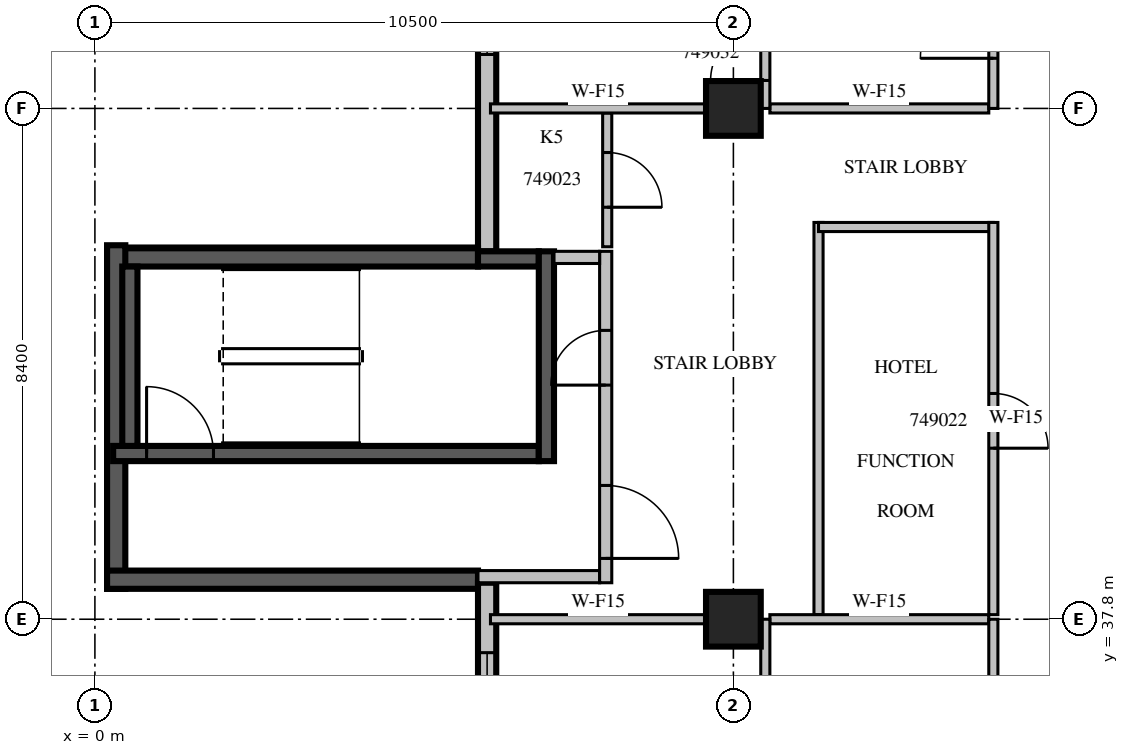
"""IFC4 building model, lengths in metres.
Left out: names, types, materials, properties, quantities, classifications, styles, units other than length and angle.
Written with IfcOpenShell. Run it as: python <this file> out.ifc"""

import sys

from ifc_helpers import new_model, si_unit, direction, frame, frame_2d, origin, origin_2d, place, context, subcontext, project, spatial, rectangle, extrude, source, transform, mapped, element, fill, save


model = new_model("IFC4")
c1 = context("Model", 3, precision=1e-05, world=origin(), true_north=direction((0.0, 1.0)))
c2 = subcontext(c1, "Body", "Model", "MODEL_VIEW")
j1 = project(units=[si_unit("LENGTHUNIT", "METRE"), si_unit("PLANEANGLEUNIT", "RADIAN")], contexts=[c1])
p1 = place(None, origin())
s1 = spatial("IfcSite", under=j1, at=p1, CompositionType="ELEMENT")
p2 = place(p1, origin())
s2 = spatial("IfcBuilding", under=s1, at=p2, CompositionType="ELEMENT")
p3 = place(p2, frame((0.0, 0.0, 219.6)))
s3 = spatial("IfcBuildingStorey", under=s2, at=p3, CompositionType="ELEMENT", Elevation=219.6)
m1 = source(origin(), c2, "Body", "SweptSolid", [
    extrude(rectangle(XDim=0.9, YDim=0.9, at=origin_2d()), origin(), (0.0, 0.0, 1.0), 3.8),
])
for number, where, z_axis, x_axis in (
    (1, (10.5, 37.8, 0.0), (0.0, 0.0, 1.0), (1.0, 0.0, 0.0)),
    (2, (10.5, 46.2, 0.0), (0.0, 0.0, 1.0), (1.0, 0.0, 0.0)),
):
    element("IfcColumn", number, at=place(p3, frame(where, z_axis=z_axis, x_axis=x_axis)), inside=s3, PredefinedType="COLUMN", context=c2, shape_type="MappedRepresentation", body=[
        mapped(m1, transform((0.0, 0.0, 0.0), scale=1.0)),
    ])
m2 = source(origin(), c2, "Body", "SweptSolid", [
    extrude(rectangle(XDim=9.91, YDim=0.3, at=frame_2d((4.955, 0.0))), origin(), (0.0, 0.0, 1.0), 3.4),
])
p4 = place(p3, frame((6.45, 53.76, 0.0), z_axis=(0.0, 0.0, 1.0), x_axis=(0.0, -1.0, 0.0)))
e3 = element("IfcWall", 3, at=p4, inside=s3, PredefinedType="STANDARD", context=c2, shape_type="MappedRepresentation", body=[
    mapped(m2, transform((0.0, 0.0, 0.0), scale=1.0)),
])
m3 = source(origin(), c2, "Body", "SweptSolid", [
    extrude(rectangle(XDim=2.4, YDim=2.3, at=frame_2d((1.2, 1.15))), frame((0.0, 0.16, 0.0), z_axis=(0.0, -1.0, 0.0), x_axis=(1.0, 0.0, 0.0)), (0.0, 0.0, 1.0), 0.32),
])
p5 = place(p4, frame((4.272, 0.0, 0.6)))
e4 = element("IfcOpeningElement", 4, at=p5, cuts=e3, PredefinedType="OPENING", context=c2, shape_type="MappedRepresentation", body=[
    mapped(m3, transform((0.0, 0.0, 0.0), scale=1.0)),
])
p6 = place(p4, frame((0.936, 0.0, 0.6)))
e5 = element("IfcOpeningElement", 5, at=p6, cuts=e3, PredefinedType="OPENING", context=c2, shape_type="MappedRepresentation", body=[
    mapped(m3, transform((0.0, 0.0, 0.0), scale=1.0)),
])
m4 = source(origin(), c2, "Body", "SweptSolid", [
    extrude(rectangle(XDim=6.1, YDim=0.3, at=frame_2d((3.05, 0.0))), origin(), (0.0, 0.0, 1.0), 3.4),
])
p7 = place(p3, frame((6.3, 43.75, 0.0), z_axis=(0.0, 0.0, 1.0), x_axis=(-1.0, 0.0, 0.0)))
e6 = element("IfcWall", 6, at=p7, inside=s3, PredefinedType="SOLIDWALL", context=c2, shape_type="MappedRepresentation", body=[
    mapped(m4, transform((0.0, 0.0, 0.0), scale=1.0)),
])
m5 = source(origin(), c2, "Body", "SweptSolid", [
    extrude(rectangle(XDim=5.65, YDim=0.3, at=frame_2d((2.825, 0.0))), origin(), (0.0, 0.0, 1.0), 3.4),
])
p8 = place(p3, frame((0.35, 43.95, 0.0), z_axis=(0.0, 0.0, 1.0), x_axis=(0.0, -1.0, 0.0)))
e7 = element("IfcWall", 7, at=p8, inside=s3, PredefinedType="SOLIDWALL", context=c2, shape_type="MappedRepresentation", body=[
    mapped(m5, transform((0.0, 0.0, 0.0), scale=1.0)),
])
p9 = place(p3, frame((0.2, 38.45, 0.0), z_axis=(0.0, 0.0, 1.0), x_axis=(1.0, 0.0, 0.0)))
e8 = element("IfcWall", 8, at=p9, inside=s3, PredefinedType="SOLIDWALL", context=c2, shape_type="MappedRepresentation", body=[
    mapped(m4, transform((0.0, 0.0, 0.0), scale=1.0)),
])
m6 = source(origin(), c2, "Body", "SweptSolid", [
    extrude(rectangle(XDim=16.6, YDim=0.3, at=frame_2d((8.3, 0.0))), origin(), (0.0, 0.0, 1.0), 3.4),
])
p10 = place(p3, frame((6.45, 38.4, 0.0), z_axis=(0.0, 0.0, 1.0), x_axis=(0.0, -1.0, 0.0)))
e9 = element("IfcWall", 9, at=p10, inside=s3, PredefinedType="STANDARD", context=c2, shape_type="MappedRepresentation", body=[
    mapped(m6, transform((0.0, 0.0, 0.0), scale=1.0)),
])
m7 = source(origin(), c2, "Body", "SweptSolid", [
    extrude(rectangle(XDim=1.8, YDim=2.3, at=frame_2d((0.9, 1.15))), frame((0.0, 0.16, 0.0), z_axis=(0.0, -1.0, 0.0), x_axis=(1.0, 0.0, 0.0)), (0.0, 0.0, 1.0), 0.32),
])
p11 = place(p10, frame((1.15, 0.0, 0.6)))
e10 = element("IfcOpeningElement", 10, at=p11, cuts=e9, PredefinedType="OPENING", context=c2, shape_type="MappedRepresentation", body=[
    mapped(m7, transform((0.0, 0.0, 0.0), scale=1.0)),
])
p12 = place(p10, frame((9.438, 0.0, 0.6)))
e11 = element("IfcOpeningElement", 11, at=p12, cuts=e9, PredefinedType="OPENING", context=c2, shape_type="MappedRepresentation", body=[
    mapped(m7, transform((0.0, 0.0, 0.0), scale=1.0)),
])
m8 = source(origin(), c2, "Body", "SweptSolid", [
    extrude(rectangle(XDim=1.2, YDim=2.3, at=frame_2d((0.6, 1.15))), frame((0.0, 0.16, 0.0), z_axis=(0.0, -1.0, 0.0), x_axis=(1.0, 0.0, 0.0)), (0.0, 0.0, 1.0), 0.32),
])
p13 = place(p10, frame((14.338, 0.0, 0.6)))
e12 = element("IfcOpeningElement", 12, at=p13, cuts=e9, PredefinedType="OPENING", context=c2, shape_type="MappedRepresentation", body=[
    mapped(m8, transform((0.0, 0.0, 0.0), scale=1.0)),
])
p14 = place(p10, frame((11.887, 0.0, 0.6)))
e13 = element("IfcOpeningElement", 13, at=p14, cuts=e9, PredefinedType="OPENING", context=c2, shape_type="MappedRepresentation", body=[
    mapped(m7, transform((0.0, 0.0, 0.0), scale=1.0)),
])
m9 = source(origin(), c2, "Body", "SweptSolid", [
    extrude(rectangle(XDim=1.0, YDim=2.1, at=frame_2d((0.5, 1.05))), frame((0.0, 0.16, 0.0), z_axis=(0.0, -1.0, 0.0), x_axis=(1.0, 0.0, 0.0)), (0.0, 0.0, 1.0), 0.32),
])
p15 = place(p10, frame((5.908, 0.0, 0.0)))
e14 = element("IfcOpeningElement", 14, at=p15, cuts=e9, PredefinedType="OPENING", context=c2, shape_type="MappedRepresentation", body=[
    mapped(m9, transform((0.0, 0.0, 0.0), scale=1.0)),
])
m10 = source(origin(), c2, "Body", "SweptSolid", [
    extrude(rectangle(XDim=7.0, YDim=0.25, at=frame_2d((3.5, 0.0))), origin(), (0.0, 0.0, 1.0), 3.4),
])
p16 = place(p3, frame((0.3, 40.525, 0.0), z_axis=(0.0, 0.0, 1.0), x_axis=(1.0, 0.0, 0.0)))
e15 = element("IfcWall", 15, at=p16, inside=s3, PredefinedType="SOLIDWALL", context=c2, shape_type="MappedRepresentation", body=[
    mapped(m10, transform((0.0, 0.0, 0.0), scale=1.0)),
])
m11 = source(origin(), c2, "Body", "SweptSolid", [
    extrude(rectangle(XDim=1.1, YDim=2.1, at=frame_2d((0.55, 1.05))), frame((0.0, 0.135, 0.0), z_axis=(0.0, -1.0, 0.0), x_axis=(1.0, 0.0, 0.0)), (0.0, 0.0, 1.0), 0.27),
])
p17 = place(p16, frame((0.55, 0.0, 0.0)))
e16 = element("IfcOpeningElement", 16, at=p17, cuts=e15, PredefinedType="OPENING", context=c2, shape_type="MappedRepresentation", body=[
    mapped(m11, transform((0.0, 0.0, 0.0), scale=1.0)),
])
m12 = source(origin(), c2, "Body", "SweptSolid", [
    extrude(rectangle(XDim=1.0, YDim=0.25, at=frame_2d((0.5, 0.0))), origin(), (0.0, 0.0, 1.0), 3.4),
])
p18 = place(p3, frame((6.3, 43.725, 0.0), z_axis=(0.0, 0.0, 1.0), x_axis=(1.0, 0.0, 0.0)))
e17 = element("IfcWall", 17, at=p18, inside=s3, PredefinedType="SOLIDWALL", context=c2, shape_type="MappedRepresentation", body=[
    mapped(m12, transform((0.0, 0.0, 0.0), scale=1.0)),
])
m13 = source(origin(), c2, "Body", "SweptSolid", [
    extrude(rectangle(XDim=3.45, YDim=0.25, at=frame_2d((1.725, 0.0))), origin(), (0.0, 0.0, 1.0), 3.4),
])
p19 = place(p3, frame((7.425, 40.4, 0.0), z_axis=(0.0, 0.0, 1.0), x_axis=(0.0, 1.0, 0.0)))
e18 = element("IfcWall", 18, at=p19, inside=s3, PredefinedType="SOLIDWALL", context=c2, shape_type="MappedRepresentation", body=[
    mapped(m13, transform((0.0, 0.0, 0.0), scale=1.0)),
])
m14 = source(origin(), c2, "Body", "SweptSolid", [
    extrude(rectangle(XDim=2.95, YDim=0.25, at=frame_2d((1.475, 0.0))), origin(), (0.0, 0.0, 1.0), 3.4),
])
p20 = place(p3, frame((0.575, 40.65, 0.0), z_axis=(0.0, 0.0, 1.0), x_axis=(0.0, 1.0, 0.0)))
e19 = element("IfcWall", 19, at=p20, inside=s3, PredefinedType="SOLIDWALL", context=c2, shape_type="MappedRepresentation", body=[
    mapped(m14, transform((0.0, 0.0, 0.0), scale=1.0)),
])
m15 = source(origin(), c2, "Body", "SweptSolid", [
    extrude(rectangle(XDim=2.0, YDim=0.2, at=frame_2d((1.0, 0.0))), origin(), (0.0, 0.0, 1.0), 3.4),
])
p21 = place(p3, frame((6.3, 38.5, 0.0), z_axis=(0.0, 0.0, 1.0), x_axis=(1.0, 0.0, 0.0)))
e20 = element("IfcWall", 20, at=p21, inside=s3, PredefinedType="PARTITIONING", context=c2, shape_type="MappedRepresentation", body=[
    mapped(m15, transform((0.0, 0.0, 0.0), scale=1.0)),
])
m16 = source(origin(), c2, "Body", "SweptSolid", [
    extrude(rectangle(XDim=5.45, YDim=0.2, at=frame_2d((2.725, 0.0))), origin(), (0.0, 0.0, 1.0), 3.4),
])
p22 = place(p3, frame((8.4, 38.4, 0.0), z_axis=(0.0, 0.0, 1.0), x_axis=(0.0, 1.0, 0.0)))
e21 = element("IfcWall", 21, at=p22, inside=s3, PredefinedType="PARTITIONING", context=c2, shape_type="MappedRepresentation", body=[
    mapped(m16, transform((0.0, 0.0, 0.0), scale=1.0)),
])
m17 = source(origin(), c2, "Body", "SweptSolid", [
    extrude(rectangle(XDim=1.2, YDim=2.1, at=frame_2d((0.6, 1.05))), frame((0.0, 0.11, 0.0), z_axis=(0.0, -1.0, 0.0), x_axis=(1.0, 0.0, 0.0)), (0.0, 0.0, 1.0), 0.22),
])
p23 = place(p22, frame((0.4, 0.0, 0.0)))
e22 = element("IfcOpeningElement", 22, at=p23, cuts=e21, PredefinedType="OPENING", context=c2, shape_type="MappedRepresentation", body=[
    mapped(m17, transform((0.0, 0.0, 0.0), scale=1.0)),
])
m18 = source(origin(), c2, "Body", "SweptSolid", [
    extrude(rectangle(XDim=0.9, YDim=2.1, at=frame_2d((0.45, 1.05))), frame((0.0, 0.11, 0.0), z_axis=(0.0, -1.0, 0.0), x_axis=(1.0, 0.0, 0.0)), (0.0, 0.0, 1.0), 0.22),
])
p24 = place(p22, frame((3.25, 0.0, 0.0)))
e23 = element("IfcOpeningElement", 23, at=p24, cuts=e21, PredefinedType="OPENING", context=c2, shape_type="MappedRepresentation", body=[
    mapped(m18, transform((0.0, 0.0, 0.0), scale=1.0)),
])
m19 = source(origin(), c2, "Body", "SweptSolid", [
    extrude(rectangle(XDim=0.75, YDim=0.2, at=frame_2d((0.375, 0.0))), origin(), (0.0, 0.0, 1.0), 3.4),
])
p25 = place(p3, frame((7.55, 43.75, 0.0), z_axis=(0.0, 0.0, 1.0), x_axis=(1.0, 0.0, 0.0)))
e24 = element("IfcWall", 24, at=p25, inside=s3, PredefinedType="PARTITIONING", context=c2, shape_type="MappedRepresentation", body=[
    mapped(m19, transform((0.0, 0.0, 0.0), scale=1.0)),
])
m20 = source(origin(), c2, "Body", "SweptSolid", [
    extrude(rectangle(XDim=6.45, YDim=0.15, at=frame_2d((3.225, 0.0))), origin(), (0.0, 0.0, 1.0), 3.4),
])
p26 = place(p3, frame((11.9, 44.325, 0.0), z_axis=(0.0, 0.0, 1.0), x_axis=(0.0, -1.0, 0.0)))
e25 = element("IfcWall", 25, at=p26, inside=s3, PredefinedType="PARTITIONING", context=c2, shape_type="MappedRepresentation", body=[
    mapped(m20, transform((0.0, 0.0, 0.0), scale=1.0)),
])
m21 = source(origin(), c2, "Body", "SweptSolid", [
    extrude(rectangle(XDim=2.875, YDim=0.15, at=frame_2d((1.438, 0.0))), origin(), (0.0, 0.0, 1.0), 3.4),
])
p27 = place(p3, frame((14.775, 44.25, 0.0), z_axis=(0.0, 0.0, 1.0), x_axis=(-1.0, 0.0, 0.0)))
e26 = element("IfcWall", 26, at=p27, inside=s3, PredefinedType="PARTITIONING", context=c2, shape_type="MappedRepresentation", body=[
    mapped(m21, transform((0.0, 0.0, 0.0), scale=1.0)),
])
p28 = place(p3, frame((14.775, 37.875, 0.0), z_axis=(0.0, 0.0, 1.0), x_axis=(0.0, 1.0, 0.0)))
e27 = element("IfcWall", 27, at=p28, inside=s3, PredefinedType="PARTITIONING", context=c2, shape_type="MappedRepresentation", body=[
    mapped(m20, transform((0.0, 0.0, 0.0), scale=1.0)),
])
m22 = source(origin(), c2, "Body", "SweptSolid", [
    extrude(rectangle(XDim=0.9, YDim=2.1, at=frame_2d((0.45, 1.05))), frame((0.0, 0.085, 0.0), z_axis=(0.0, -1.0, 0.0), x_axis=(1.0, 0.0, 0.0)), (0.0, 0.0, 1.0), 0.17),
])
p29 = place(p28, frame((2.737, 0.0, 0.0)))
e28 = element("IfcOpeningElement", 28, at=p29, cuts=e27, PredefinedType="OPENING", context=c2, shape_type="MappedRepresentation", body=[
    mapped(m22, transform((0.0, 0.0, 0.0), scale=1.0)),
])
m23 = source(origin(), c2, "Body", "SweptSolid", [
    extrude(rectangle(XDim=2.2, YDim=0.15, at=frame_2d((1.1, 0.0))), origin(), (0.0, 0.0, 1.0), 3.4),
])
p30 = place(p3, frame((8.425, 43.925, 0.0), z_axis=(0.0, 0.0, 1.0), x_axis=(0.0, 1.0, 0.0)))
e29 = element("IfcWall", 29, at=p30, inside=s3, PredefinedType="PARTITIONING", context=c2, shape_type="MappedRepresentation", body=[
    mapped(m23, transform((0.0, 0.0, 0.0), scale=1.0)),
])
p31 = place(p30, frame((0.65, 0.0, 0.0)))
e30 = element("IfcOpeningElement", 30, at=p31, cuts=e29, PredefinedType="OPENING", context=c2, shape_type="MappedRepresentation", body=[
    mapped(m22, transform((0.0, 0.0, 0.0), scale=1.0)),
])
m24 = source(origin(), c2, "Body", "SweptSolid", [
    extrude(rectangle(XDim=3.546, YDim=0.15, at=frame_2d((1.773, 0.0))), origin(), (0.0, 0.0, 1.0), 3.4),
])
p32 = place(p3, frame((10.051, 37.8, 0.0), z_axis=(0.0, 0.0, 1.0), x_axis=(-1.0, 0.0, 0.0)))
e31 = element("IfcWall", 31, at=p32, inside=s3, PredefinedType="PARTITIONING", context=c2, shape_type="MappedRepresentation", body=[
    mapped(m24, transform((0.0, 0.0, 0.0), scale=1.0)),
])
m25 = source(origin(), c2, "Body", "SweptSolid", [
    extrude(rectangle(XDim=3.6, YDim=0.15, at=frame_2d((1.8, 0.0))), origin(), (0.0, 0.0, 1.0), 3.4),
])
p33 = place(p3, frame((14.7, 37.8, 0.0), z_axis=(0.0, 0.0, 1.0), x_axis=(-1.0, 0.0, 0.0)))
e32 = element("IfcWall", 32, at=p33, inside=s3, PredefinedType="PARTITIONING", context=c2, shape_type="MappedRepresentation", body=[
    mapped(m25, transform((0.0, 0.0, 0.0), scale=1.0)),
])
m26 = source(origin(), c2, "Body", "SweptSolid", [
    extrude(rectangle(XDim=8.4, YDim=0.15, at=frame_2d((4.2, 0.0))), origin(), (0.0, 0.0, 1.0), 3.4),
])
p34 = place(p3, frame((11.025, 29.4, 0.0), z_axis=(0.0, 0.0, 1.0), x_axis=(0.0, 1.0, 0.0)))
e33 = element("IfcWall", 33, at=p34, inside=s3, PredefinedType="PARTITIONING", context=c2, shape_type="MappedRepresentation", body=[
    mapped(m26, transform((0.0, 0.0, 0.0), scale=1.0)),
])
p35 = place(p34, frame((1.418, 0.0, 0.0)))
e34 = element("IfcOpeningElement", 34, at=p35, cuts=e33, PredefinedType="OPENING", context=c2, shape_type="MappedRepresentation", body=[
    mapped(m22, transform((0.0, 0.0, 0.0), scale=1.0)),
])
p36 = place(p34, frame((0.46, 0.0, 0.0)))
e35 = element("IfcOpeningElement", 35, at=p36, cuts=e33, PredefinedType="OPENING", context=c2, shape_type="MappedRepresentation", body=[
    mapped(m22, transform((0.0, 0.0, 0.0), scale=1.0)),
])
p37 = place(p34, frame((4.525, 0.0, 0.0)))
e36 = element("IfcOpeningElement", 36, at=p37, cuts=e33, PredefinedType="OPENING", context=c2, shape_type="MappedRepresentation", body=[
    mapped(m22, transform((0.0, 0.0, 0.0), scale=1.0)),
])
p38 = place(p34, frame((6.387, 0.0, 0.0)))
e37 = element("IfcOpeningElement", 37, at=p38, cuts=e33, PredefinedType="OPENING", context=c2, shape_type="MappedRepresentation", body=[
    mapped(m22, transform((0.0, 0.0, 0.0), scale=1.0)),
])
p39 = place(p3, frame((10.051, 46.2, 0.0), z_axis=(0.0, 0.0, 1.0), x_axis=(-1.0, 0.0, 0.0)))
e38 = element("IfcWall", 38, at=p39, inside=s3, PredefinedType="PARTITIONING", context=c2, shape_type="MappedRepresentation", body=[
    mapped(m24, transform((0.0, 0.0, 0.0), scale=1.0)),
])
p40 = place(p3, frame((14.7, 46.2, 0.0), z_axis=(0.0, 0.0, 1.0), x_axis=(-1.0, 0.0, 0.0)))
e39 = element("IfcWall", 39, at=p40, inside=s3, PredefinedType="PARTITIONING", context=c2, shape_type="MappedRepresentation", body=[
    mapped(m25, transform((0.0, 0.0, 0.0), scale=1.0)),
])
m27 = source(origin(), c2, "Body", "SweptSolid", [
    extrude(rectangle(XDim=7.26, YDim=0.15, at=frame_2d((3.63, 0.0))), origin(), (0.0, 0.0, 1.0), 3.4),
])
p41 = place(p3, frame((11.025, 46.2, 0.0), z_axis=(0.0, 0.0, 1.0), x_axis=(0.0, 1.0, 0.0)))
e40 = element("IfcWall", 40, at=p41, inside=s3, PredefinedType="PARTITIONING", context=c2, shape_type="MappedRepresentation", body=[
    mapped(m27, transform((0.0, 0.0, 0.0), scale=1.0)),
])
p42 = place(p41, frame((1.412, 0.0, 0.0)))
e41 = element("IfcOpeningElement", 41, at=p42, cuts=e40, PredefinedType="OPENING", context=c2, shape_type="MappedRepresentation", body=[
    mapped(m22, transform((0.0, 0.0, 0.0), scale=1.0)),
])
p43 = place(p41, frame((0.46, 0.0, 0.0)))
e42 = element("IfcOpeningElement", 42, at=p43, cuts=e40, PredefinedType="OPENING", context=c2, shape_type="MappedRepresentation", body=[
    mapped(m22, transform((0.0, 0.0, 0.0), scale=1.0)),
])
p44 = place(p41, frame((3.901, 0.0, 0.0)))
e43 = element("IfcOpeningElement", 43, at=p44, cuts=e40, PredefinedType="OPENING", context=c2, shape_type="MappedRepresentation", body=[
    mapped(m22, transform((0.0, 0.0, 0.0), scale=1.0)),
])
p45 = place(p3, frame((14.775, 29.4, 0.0), z_axis=(0.0, 0.0, 1.0), x_axis=(0.0, 1.0, 0.0)))
e44 = element("IfcWall", 44, at=p45, inside=s3, PredefinedType="PARTITIONING", context=c2, shape_type="MappedRepresentation", body=[
    mapped(m26, transform((0.0, 0.0, 0.0), scale=1.0)),
])
m28 = source(origin(), c2, "Body", "SweptSolid", [
    extrude(rectangle(XDim=1.2, YDim=2.1, at=frame_2d((0.6, 1.05))), frame((0.0, 0.085, 0.0), z_axis=(0.0, -1.0, 0.0), x_axis=(1.0, 0.0, 0.0)), (0.0, 0.0, 1.0), 0.17),
])
p46 = place(p45, frame((1.03, 0.0, 0.0)))
e45 = element("IfcOpeningElement", 45, at=p46, cuts=e44, PredefinedType="OPENING", context=c2, shape_type="MappedRepresentation", body=[
    mapped(m28, transform((0.0, 0.0, 0.0), scale=1.0)),
])
p47 = place(p3, frame((14.775, 46.2, 0.0), z_axis=(0.0, 0.0, 1.0), x_axis=(0.0, 1.0, 0.0)))
e46 = element("IfcWall", 46, at=p47, inside=s3, PredefinedType="PARTITIONING", context=c2, shape_type="MappedRepresentation", body=[
    mapped(m27, transform((0.0, 0.0, 0.0), scale=1.0)),
])
p48 = place(p47, frame((0.825, 0.0, 0.0)))
e47 = element("IfcOpeningElement", 47, at=p48, cuts=e46, PredefinedType="OPENING", context=c2, shape_type="MappedRepresentation", body=[
    mapped(m28, transform((0.0, 0.0, 0.0), scale=1.0)),
])
m29 = source(origin(), c2, "Body", "SweptSolid", [
    extrude(rectangle(XDim=2.4, YDim=2.3, at=frame_2d((1.2, 1.15))), frame((0.0, 0.03, 0.0), z_axis=(0.0, -1.0, 0.0), x_axis=(1.0, 0.0, 0.0)), (0.0, 0.0, 1.0), 0.06),
])
p49 = place(p5, origin())
e48 = element("IfcWindow", 48, at=p49, inside=s3, PartitioningType="SINGLE_PANEL", PredefinedType="WINDOW", context=c2, shape_type="MappedRepresentation", body=[
    mapped(m29, transform((0.0, 0.0, 0.0), scale=1.0)),
])
fill(e4, e48)
m30 = source(origin(), c2, "Body", "SweptSolid", [
    extrude(rectangle(XDim=1.8, YDim=2.3, at=frame_2d((0.9, 1.15))), frame((0.0, 0.03, 0.0), z_axis=(0.0, -1.0, 0.0), x_axis=(1.0, 0.0, 0.0)), (0.0, 0.0, 1.0), 0.06),
])
p50 = place(p11, origin())
e49 = element("IfcWindow", 49, at=p50, inside=s3, PartitioningType="SINGLE_PANEL", PredefinedType="WINDOW", context=c2, shape_type="MappedRepresentation", body=[
    mapped(m30, transform((0.0, 0.0, 0.0), scale=1.0)),
])
fill(e10, e49)
m31 = source(origin(), c2, "Body", "SweptSolid", [
    extrude(rectangle(XDim=1.1, YDim=2.1, at=frame_2d((0.55, 1.05))), frame((0.0, 0.025, 0.0), z_axis=(0.0, -1.0, 0.0), x_axis=(1.0, 0.0, 0.0)), (0.0, 0.0, 1.0), 0.05),
])
p51 = place(p17, origin())
e50 = element("IfcDoor", 50, at=p51, inside=s3, OperationType="SINGLE_SWING_LEFT", PredefinedType="DOOR", context=c2, shape_type="MappedRepresentation", body=[
    mapped(m31, transform((0.0, 0.0, 0.0), scale=1.0)),
])
fill(e16, e50)
m32 = source(origin(), c2, "Body", "SweptSolid", [
    extrude(rectangle(XDim=1.2, YDim=2.1, at=frame_2d((0.6, 1.05))), frame((0.0, 0.025, 0.0), z_axis=(0.0, -1.0, 0.0), x_axis=(1.0, 0.0, 0.0)), (0.0, 0.0, 1.0), 0.05),
])
p52 = place(p23, origin())
e51 = element("IfcDoor", 51, at=p52, inside=s3, OperationType="SINGLE_SWING_RIGHT", PredefinedType="DOOR", context=c2, shape_type="MappedRepresentation", body=[
    mapped(m32, transform((0.0, 0.0, 0.0), scale=1.0)),
])
fill(e22, e51)
m33 = source(origin(), c2, "Body", "SweptSolid", [
    extrude(rectangle(XDim=0.9, YDim=2.1, at=frame_2d((0.45, 1.05))), frame((0.0, 0.025, 0.0), z_axis=(0.0, -1.0, 0.0), x_axis=(1.0, 0.0, 0.0)), (0.0, 0.0, 1.0), 0.05),
])
p53 = place(p24, origin())
e52 = element("IfcDoor", 52, at=p53, inside=s3, OperationType="SINGLE_SWING_LEFT", PredefinedType="DOOR", context=c2, shape_type="MappedRepresentation", body=[
    mapped(m33, transform((0.0, 0.0, 0.0), scale=1.0)),
])
fill(e23, e52)
p54 = place(p29, origin())
e53 = element("IfcDoor", 53, at=p54, inside=s3, OperationType="SINGLE_SWING_RIGHT", PredefinedType="DOOR", context=c2, shape_type="MappedRepresentation", body=[
    mapped(m33, transform((0.0, 0.0, 0.0), scale=1.0)),
])
fill(e28, e53)
p55 = place(p31, origin())
e54 = element("IfcDoor", 54, at=p55, inside=s3, OperationType="SINGLE_SWING_RIGHT", PredefinedType="DOOR", context=c2, shape_type="MappedRepresentation", body=[
    mapped(m33, transform((0.0, 0.0, 0.0), scale=1.0)),
])
fill(e30, e54)
p56 = place(p48, origin())
e55 = element("IfcDoor", 55, at=p56, inside=s3, OperationType="SINGLE_SWING_LEFT", PredefinedType="DOOR", context=c2, shape_type="MappedRepresentation", body=[
    mapped(m32, transform((0.0, 0.0, 0.0), scale=1.0)),
])
fill(e47, e55)
p57 = place(p43, origin())
e56 = element("IfcDoor", 56, at=p57, inside=s3, OperationType="SINGLE_SWING_LEFT", PredefinedType="DOOR", context=c2, shape_type="MappedRepresentation", body=[
    mapped(m33, transform((0.0, 0.0, 0.0), scale=1.0)),
])
fill(e42, e56)
save(model, sys.argv[1])
